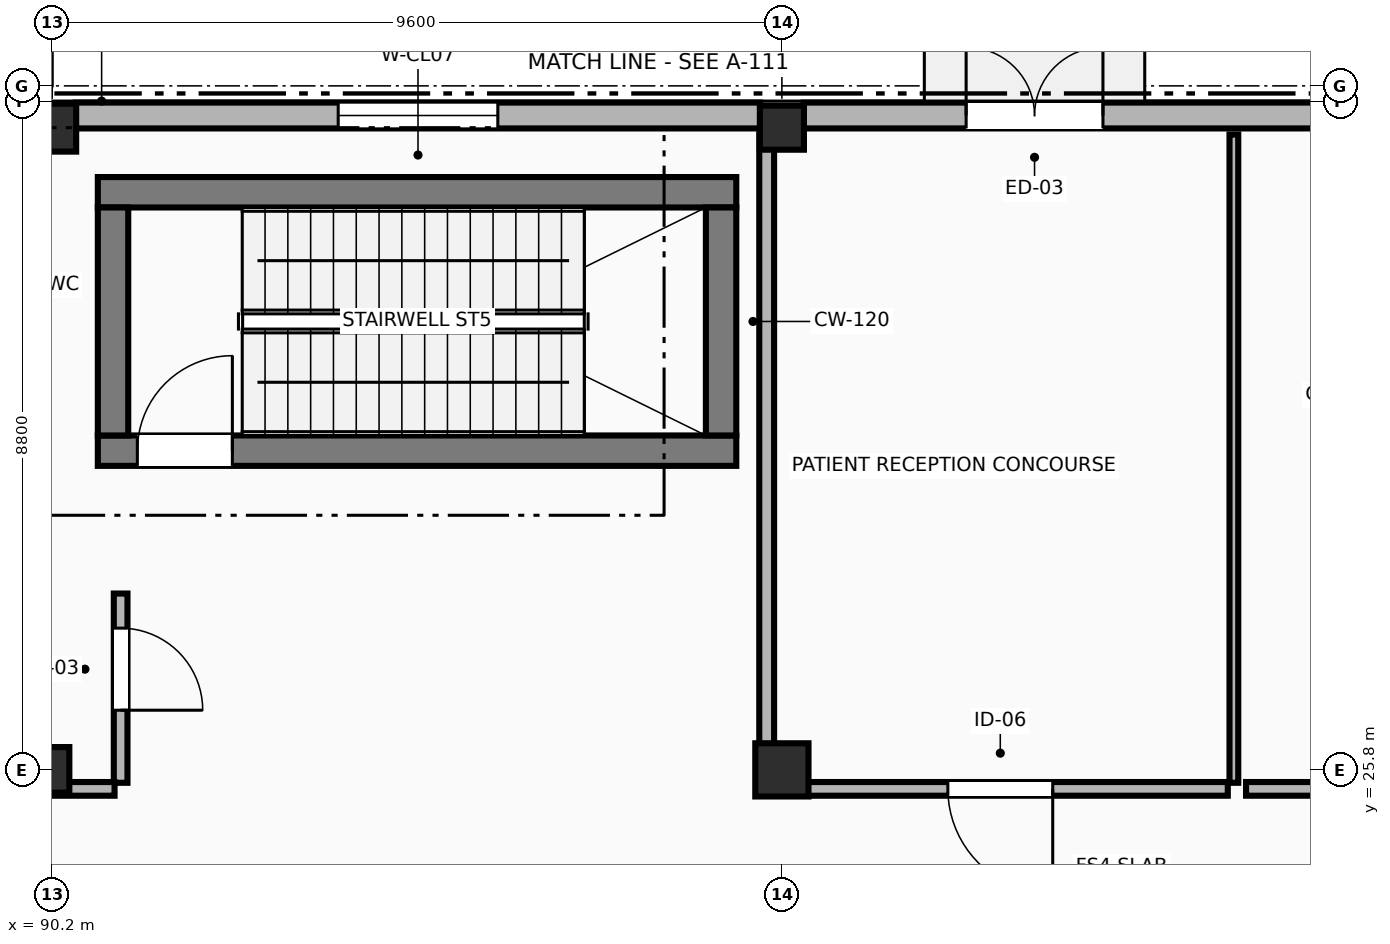
"""IFC4 building model, lengths in metres.
Left out: names, types, materials, properties, quantities, classifications, styles, units other than length and angle.
Written with IfcOpenShell. Run it as: python <this file> out.ifc"""

import sys

from ifc_helpers import new_model, si_unit, direction, frame, frame_2d, origin, origin_2d, place, context, subcontext, project, spatial, rectangle, extrude, element, fill, save


model = new_model("IFC4")
c1 = context("Model", 3, precision=1e-05, world=origin(), true_north=direction((0.0, 1.0)))
c2 = subcontext(c1, "Body", "Model", "MODEL_VIEW")
j1 = project(units=[si_unit("LENGTHUNIT", "METRE"), si_unit("PLANEANGLEUNIT", "RADIAN")], contexts=[c1])
p1 = place(None, origin())
s1 = spatial("IfcSite", under=j1, at=p1, CompositionType="ELEMENT")
p2 = place(p1, origin())
s2 = spatial("IfcBuilding", under=s1, at=p2, CompositionType="ELEMENT")
p3 = place(p2, origin())
s3 = spatial("IfcBuildingStorey", under=s2, at=p3, CompositionType="ELEMENT", Elevation=0.0)
p4 = place(p3, frame((90.2, 25.8, 0.0), z_axis=(0.0, 0.0, 1.0), x_axis=(1.0, 0.0, 0.0)))
e1 = element("IfcColumn", 1, at=p4, inside=s3, PredefinedType="COLUMN", context=c2, shape_type="SweptSolid", body=[
    extrude(rectangle(XDim=0.45, YDim=0.6, at=origin_2d()), origin(), (0.0, 0.0, 1.0), 5.4),
])
p5 = place(p3, frame((90.2, 34.25, 0.0), z_axis=(0.0, 0.0, 1.0), x_axis=(1.0, 0.0, 0.0)))
e2 = element("IfcColumn", 2, at=p5, inside=s3, PredefinedType="COLUMN", context=c2, shape_type="SweptSolid", body=[
    extrude(rectangle(XDim=0.63, YDim=0.63, at=origin_2d()), origin(), (0.0, 0.0, 1.0), 5.4),
])
p6 = place(p3, frame((99.8, 25.8, 0.0), z_axis=(0.0, 0.0, 1.0), x_axis=(1.0, 0.0, 0.0)))
e3 = element("IfcColumn", 3, at=p6, inside=s3, PredefinedType="COLUMN", context=c2, shape_type="SweptSolid", body=[
    extrude(rectangle(XDim=0.7, YDim=0.7, at=origin_2d()), origin(), (0.0, 0.0, 1.0), 5.4),
])
p7 = place(p3, frame((99.8, 34.25, 0.0), z_axis=(0.0, 0.0, 1.0), x_axis=(1.0, 0.0, 0.0)))
e4 = element("IfcColumn", 4, at=p7, inside=s3, PredefinedType="COLUMN", context=c2, shape_type="SweptSolid", body=[
    extrude(rectangle(XDim=0.58, YDim=0.58, at=origin_2d()), origin(), (0.0, 0.0, 1.0), 5.4),
])
p8 = place(p3, frame((109.17, 34.41, 0.0), z_axis=(0.0, 0.0, 1.0), x_axis=(-1.0, 0.0, 0.0)))
e5 = element("IfcWall", 5, at=p8, inside=s3, PredefinedType="STANDARD", context=c2, shape_type="SweptSolid", body=[
    extrude(rectangle(XDim=9.085, YDim=0.34, at=frame_2d((4.542, 0.0))), origin(), (0.0, 0.0, 1.0), 4.385),
])
p9 = place(p8, frame((5.146, 0.0, 0.0)))
e6 = element("IfcOpeningElement", 6, at=p9, cuts=e5, PredefinedType="OPENING", context=c2, shape_type="SweptSolid", body=[
    extrude(rectangle(XDim=1.8, YDim=2.3, at=frame_2d((0.9, 1.15))), frame((0.0, 0.18, 0.0), z_axis=(0.0, -1.0, 0.0), x_axis=(1.0, 0.0, 0.0)), (0.0, 0.0, 1.0), 0.36),
])
p10 = place(p3, frame((99.515, 34.41, 0.0), z_axis=(0.0, 0.0, 1.0), x_axis=(-1.0, 0.0, 0.0)))
e7 = element("IfcWall", 7, at=p10, inside=s3, PredefinedType="STANDARD", context=c2, shape_type="SweptSolid", body=[
    extrude(rectangle(XDim=9.005, YDim=0.34, at=frame_2d((4.502, 0.0))), origin(), (0.0, 0.0, 1.0), 4.415),
])
p11 = place(p10, frame((3.452, 0.0, 0.95)))
e8 = element("IfcOpeningElement", 8, at=p11, cuts=e7, PredefinedType="OPENING", context=c2, shape_type="SweptSolid", body=[
    extrude(rectangle(XDim=2.1, YDim=1.8, at=frame_2d((1.05, 0.9))), frame((0.0, 0.18, 0.0), z_axis=(0.0, -1.0, 0.0), x_axis=(1.0, 0.0, 0.0)), (0.0, 0.0, 1.0), 0.36),
])
p12 = place(p3, frame((90.8, 30.0, 0.0), z_axis=(0.0, 0.0, 1.0), x_axis=(1.0, 0.0, 0.0)))
e9 = element("IfcWall", 9, at=p12, inside=s3, PredefinedType="SHEAR", context=c2, shape_type="SweptSolid", body=[
    extrude(rectangle(XDim=8.4, YDim=0.4, at=frame_2d((4.2, 0.0))), origin(), (0.0, 0.0, 1.0), 5.12),
])
p13 = place(p12, frame((0.52, 0.0, 0.0)))
e10 = element("IfcOpeningElement", 10, at=p13, cuts=e9, PredefinedType="OPENING", context=c2, shape_type="SweptSolid", body=[
    extrude(rectangle(XDim=1.25, YDim=2.2, at=frame_2d((0.625, 1.1))), frame((0.0, 0.21, 0.0), z_axis=(0.0, -1.0, 0.0), x_axis=(1.0, 0.0, 0.0)), (0.0, 0.0, 1.0), 0.42),
])
p14 = place(p3, frame((99.2, 33.4, 0.0), z_axis=(0.0, 0.0, 1.0), x_axis=(-1.0, 0.0, 0.0)))
e11 = element("IfcWall", 11, at=p14, inside=s3, PredefinedType="SHEAR", context=c2, shape_type="SweptSolid", body=[
    extrude(rectangle(XDim=8.4, YDim=0.4, at=frame_2d((4.2, 0.0))), origin(), (0.0, 0.0, 1.0), 5.12),
])
for number, where, z_axis, x_axis in (
    (12, (91.0, 30.2, 0.0), (0.0, 0.0, 1.0), (0.0, 1.0, 0.0)),
    (13, (99.0, 33.2, 0.0), (0.0, 0.0, 1.0), (0.0, -1.0, 0.0)),
):
    element("IfcWall", number, at=place(p3, frame(where, z_axis=z_axis, x_axis=x_axis)), inside=s3, PredefinedType="SHEAR", context=c2, shape_type="SweptSolid", body=[
        extrude(rectangle(XDim=3.0, YDim=0.4, at=frame_2d((1.5, 0.0))), origin(), (0.0, 0.0, 1.0), 5.12),
    ])
p15 = place(p3, frame((91.1, 28.12, 0.0), z_axis=(0.0, 0.0, 1.0), x_axis=(0.0, -1.0, 0.0)))
e14 = element("IfcWall", 14, at=p15, inside=s3, PredefinedType="PARTITIONING", context=c2, shape_type="SweptSolid", body=[
    extrude(rectangle(XDim=2.49, YDim=0.18, at=frame_2d((1.245, 0.0))), origin(), (0.0, 0.0, 1.0), 5.12),
])
p16 = place(p15, frame((0.455, 0.0, 0.0)))
e15 = element("IfcOpeningElement", 15, at=p16, cuts=e14, PredefinedType="OPENING", context=c2, shape_type="SweptSolid", body=[
    extrude(rectangle(XDim=1.08, YDim=2.2, at=frame_2d((0.54, 1.1))), frame((0.0, 0.1, 0.0), z_axis=(0.0, -1.0, 0.0), x_axis=(1.0, 0.0, 0.0)), (0.0, 0.0, 1.0), 0.2),
])
p17 = place(p3, frame((91.02, 25.55, 0.0), z_axis=(0.0, 0.0, 1.0), x_axis=(-1.0, 0.0, 0.0)))
e16 = element("IfcWall", 16, at=p17, inside=s3, PredefinedType="PARTITIONING", context=c2, shape_type="SweptSolid", body=[
    extrude(rectangle(XDim=2.7, YDim=0.18, at=frame_2d((1.35, 0.0))), origin(), (0.0, 0.0, 1.0), 4.425),
])
p18 = place(p3, frame((105.747, 34.16, 0.0), z_axis=(0.0, 0.0, 1.0), x_axis=(0.0, -1.0, 0.0)))
e17 = element("IfcWall", 17, at=p18, inside=s3, PredefinedType="PARTITIONING", context=c2, shape_type="SweptSolid", body=[
    extrude(rectangle(XDim=8.53, YDim=0.115, at=frame_2d((4.265, 0.0))), origin(), (0.0, 0.0, 1.0), 5.12),
])
p19 = place(p3, frame((105.667, 25.55, 0.0), z_axis=(0.0, 0.0, 1.0), x_axis=(-1.0, 0.0, 0.0)))
e18 = element("IfcWall", 18, at=p19, inside=s3, PredefinedType="PARTITIONING", context=c2, shape_type="SweptSolid", body=[
    extrude(rectangle(XDim=5.987, YDim=0.18, at=frame_2d((2.993, 0.0))), origin(), (0.0, 0.0, 1.0), 4.455),
])
p20 = place(p19, frame((2.303, 0.0, 0.0)))
e19 = element("IfcOpeningElement", 19, at=p20, cuts=e18, PredefinedType="OPENING", context=c2, shape_type="SweptSolid", body=[
    extrude(rectangle(XDim=1.38, YDim=2.25, at=frame_2d((0.69, 1.125))), frame((0.0, 0.1, 0.0), z_axis=(0.0, -1.0, 0.0), x_axis=(1.0, 0.0, 0.0)), (0.0, 0.0, 1.0), 0.2),
])
p21 = place(p3, frame((99.6, 25.63, 0.0), z_axis=(0.0, 0.0, 1.0), x_axis=(0.0, 1.0, 0.0)))
e20 = element("IfcWall", 20, at=p21, inside=s3, PredefinedType="PARTITIONING", context=c2, shape_type="SweptSolid", body=[
    extrude(rectangle(XDim=8.53, YDim=0.195, at=frame_2d((4.265, 0.0))), origin(), (0.0, 0.0, 1.0), 4.605),
])
p22 = place(p3, frame((111.893, 25.55, 0.0), z_axis=(0.0, 0.0, 1.0), x_axis=(-1.0, 0.0, 0.0)))
e21 = element("IfcWall", 21, at=p22, inside=s3, PredefinedType="PARTITIONING", context=c2, shape_type="SweptSolid", body=[
    extrude(rectangle(XDim=5.987, YDim=0.18, at=frame_2d((2.993, 0.0))), origin(), (0.0, 0.0, 1.0), 4.455),
])
p23 = place(p22, frame((3.383, 0.0, 0.0)))
e22 = element("IfcOpeningElement", 22, at=p23, cuts=e21, PredefinedType="OPENING", context=c2, shape_type="SweptSolid", body=[
    extrude(rectangle(XDim=1.22, YDim=2.18, at=frame_2d((0.61, 1.09))), frame((0.0, 0.1, 0.0), z_axis=(0.0, -1.0, 0.0), x_axis=(1.0, 0.0, 0.0)), (0.0, 0.0, 1.0), 0.2),
])
p24 = place(p9, frame((1.8, 0.0, 0.0), z_axis=(0.0, 0.0, 1.0), x_axis=(-1.0, 0.0, 0.0)))
e23 = element("IfcDoor", 23, at=p24, inside=s3, OperationType="DOUBLE_DOOR_SINGLE_SWING", PredefinedType="DOOR", context=c2, shape_type="SweptSolid", body=[
    extrude(rectangle(XDim=1.8, YDim=2.3, at=frame_2d((0.9, 1.15))), frame((0.0, 0.025, 0.0), z_axis=(0.0, -1.0, 0.0), x_axis=(1.0, 0.0, 0.0)), (0.0, 0.0, 1.0), 0.05),
])
fill(e6, e23)
p25 = place(p11, origin())
e24 = element("IfcWindow", 24, at=p25, inside=s3, PartitioningType="SINGLE_PANEL", PredefinedType="WINDOW", context=c2, shape_type="SweptSolid", body=[
    extrude(rectangle(XDim=2.1, YDim=1.8, at=frame_2d((1.05, 0.9))), frame((0.0, 0.03, 0.0), z_axis=(0.0, -1.0, 0.0), x_axis=(1.0, 0.0, 0.0)), (0.0, 0.0, 1.0), 0.06),
])
fill(e8, e24)
p26 = place(p13, origin())
e25 = element("IfcDoor", 25, at=p26, inside=s3, OperationType="SINGLE_SWING_RIGHT", PredefinedType="DOOR", context=c2, shape_type="SweptSolid", body=[
    extrude(rectangle(XDim=1.25, YDim=2.2, at=frame_2d((0.625, 1.1))), frame((0.0, 0.025, 0.0), z_axis=(0.0, -1.0, 0.0), x_axis=(1.0, 0.0, 0.0)), (0.0, 0.0, 1.0), 0.05),
])
fill(e10, e25)
p27 = place(p16, origin())
e26 = element("IfcDoor", 26, at=p27, inside=s3, OperationType="SINGLE_SWING_RIGHT", PredefinedType="DOOR", context=c2, shape_type="SweptSolid", body=[
    extrude(rectangle(XDim=1.08, YDim=2.2, at=frame_2d((0.54, 1.1))), frame((0.0, 0.025, 0.0), z_axis=(0.0, -1.0, 0.0), x_axis=(1.0, 0.0, 0.0)), (0.0, 0.0, 1.0), 0.05),
])
fill(e15, e26)
p28 = place(p20, origin())
e27 = element("IfcDoor", 27, at=p28, inside=s3, OperationType="SINGLE_SWING_LEFT", PredefinedType="DOOR", context=c2, shape_type="SweptSolid", body=[
    extrude(rectangle(XDim=1.38, YDim=2.25, at=frame_2d((0.69, 1.125))), frame((0.0, 0.025, 0.0), z_axis=(0.0, -1.0, 0.0), x_axis=(1.0, 0.0, 0.0)), (0.0, 0.0, 1.0), 0.05),
])
fill(e19, e27)
save(model, sys.argv[1])
